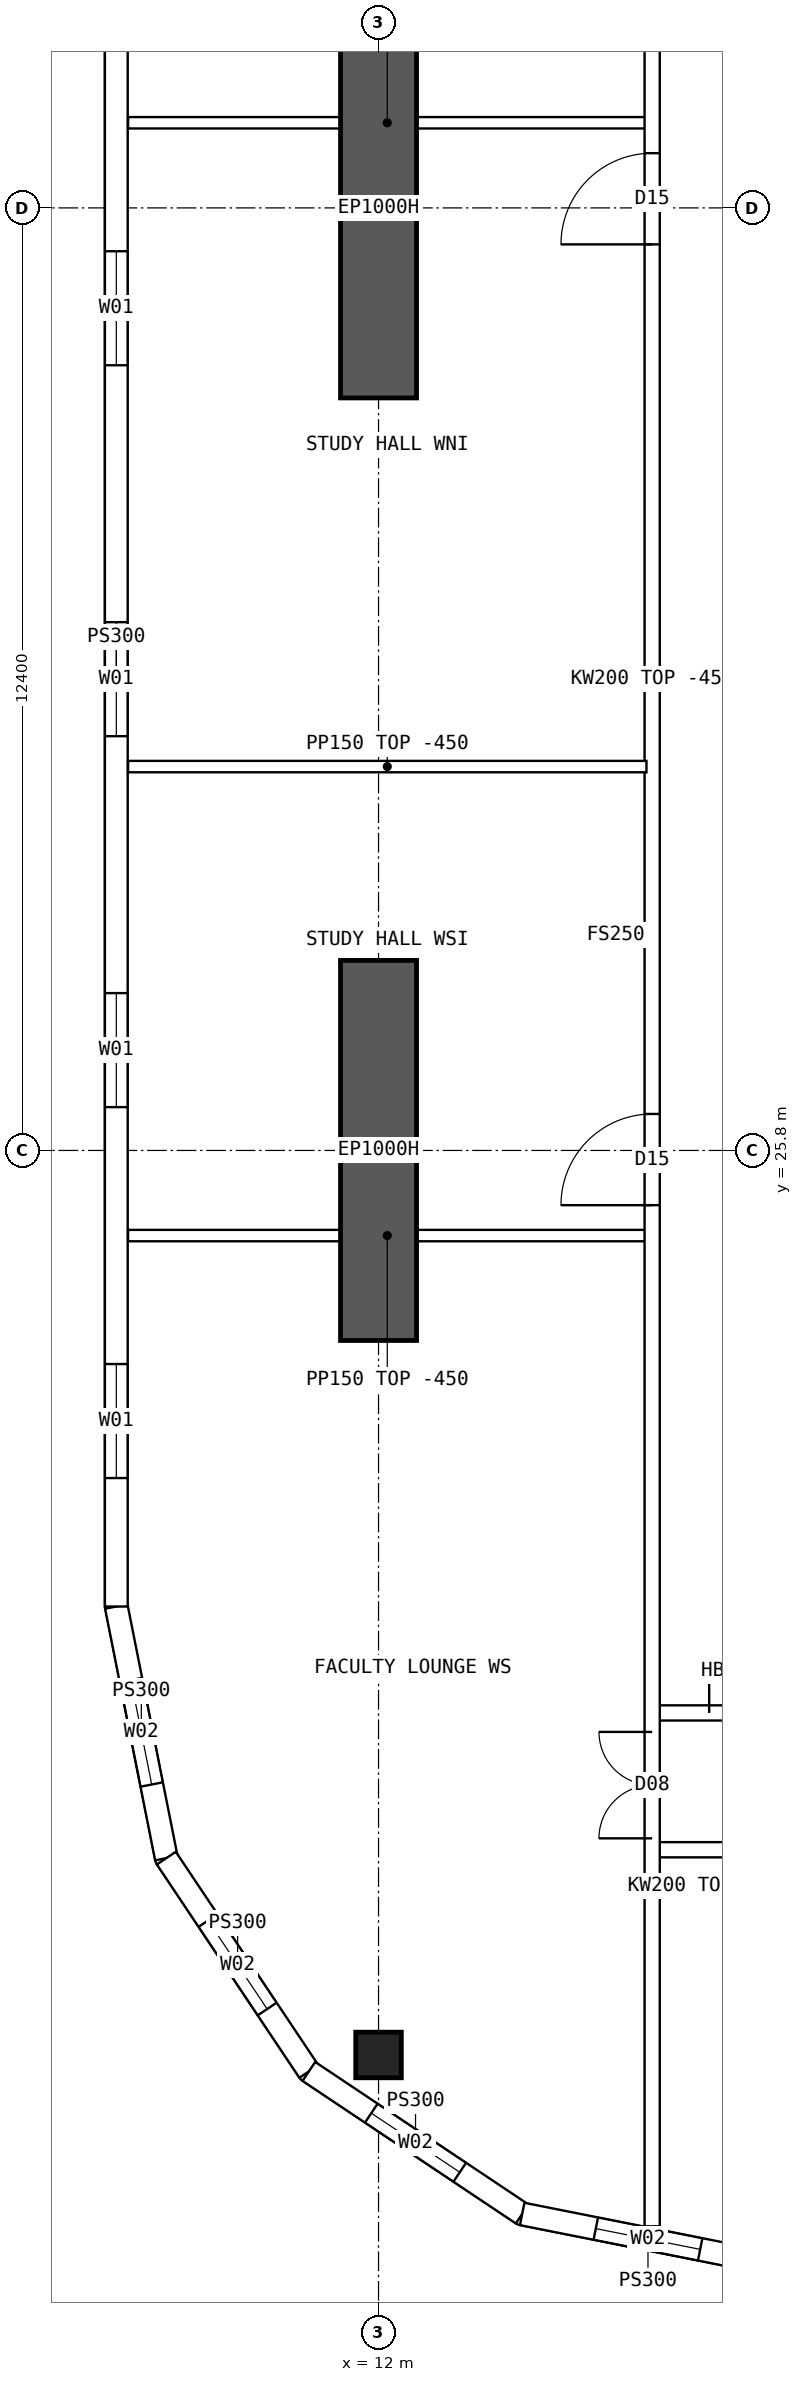
"""IFC4 building model, lengths in metres.
Left out: names, types, materials, properties, quantities, classifications, styles, units other than length and angle.
Written with IfcOpenShell. Run it as: python <this file> out.ifc"""

import sys

from ifc_helpers import new_model, si_unit, direction, frame, frame_2d, origin, origin_2d, place, context, subcontext, project, spatial, polyline, rectangle, hollow_rectangle, outline, extrude, element, fill, save


model = new_model("IFC4")
c1 = context("Model", 3, precision=1e-05, world=origin(), true_north=direction((0.0, 1.0)))
c2 = subcontext(c1, "Body", "Model", "MODEL_VIEW")
j1 = project(units=[si_unit("LENGTHUNIT", "METRE"), si_unit("PLANEANGLEUNIT", "RADIAN")], contexts=[c1])
p1 = place(None, origin())
s1 = spatial("IfcSite", under=j1, at=p1, CompositionType="ELEMENT")
p2 = place(p1, origin())
s2 = spatial("IfcBuilding", under=s1, at=p2, CompositionType="ELEMENT")
p3 = place(p2, frame((0.0, 0.0, 227.8)))
s3 = spatial("IfcBuildingStorey", under=s2, at=p3, CompositionType="ELEMENT", Elevation=227.8)
p4 = place(p3, frame((12.0, 13.9, 0.0), z_axis=(0.0, 0.0, 1.0), x_axis=(1.0, 0.0, 0.0)))
e1 = element("IfcColumn", 1, at=p4, inside=s3, PredefinedType="COLUMN", context=c2, shape_type="SweptSolid", body=[
    extrude(hollow_rectangle(XDim=0.6, YDim=0.6, WallThickness=0.06, at=origin_2d()), origin(), (0.0, 0.0, 1.0), 3.75),
])
for number, where, z_axis, x_axis in (
    (2, (12.0, 23.3, 0.0), (0.0, 0.0, 1.0), (0.0, 1.0, 0.0)),
    (3, (12.0, 35.7, 0.0), (0.0, 0.0, 1.0), (0.0, 1.0, 0.0)),
):
    element("IfcWall", number, at=place(p3, frame(where, z_axis=z_axis, x_axis=x_axis)), inside=s3, PredefinedType="SHEAR", context=c2, shape_type="SweptSolid", body=[
        extrude(rectangle(XDim=5.0, YDim=1.0, at=frame_2d((2.5, 0.0))), origin(), (0.0, 0.0, 1.0), 3.75),
    ])
p5 = place(p3, frame((8.55, 44.2, 0.0), z_axis=(0.0, 0.0, 1.0), x_axis=(0.0, -1.0, 0.0)))
e4 = element("IfcWall", 4, at=p5, inside=s3, PredefinedType="SOLIDWALL", context=c2, shape_type="SweptSolid", body=[
    extrude(outline(polyline([(-0.015, -0.15), (24.415, -0.15), (24.385, 0.15), (0.015, 0.15), (-0.015, -0.15)])), origin(), (0.0, 0.0, 1.0), 3.3),
])
p6 = place(p5, frame((1.69, 0.0, 0.9)))
e5 = element("IfcOpeningElement", 5, at=p6, cuts=e4, PredefinedType="OPENING", context=c2, shape_type="SweptSolid", body=[
    extrude(rectangle(XDim=1.5, YDim=2.0, at=frame_2d((0.75, 1.0))), frame((0.0, 0.16, 0.0), z_axis=(0.0, -1.0, 0.0), x_axis=(1.0, 0.0, 0.0)), (0.0, 0.0, 1.0), 0.32),
])
p7 = place(p5, frame((6.57, 0.0, 0.9)))
e6 = element("IfcOpeningElement", 6, at=p7, cuts=e4, PredefinedType="OPENING", context=c2, shape_type="SweptSolid", body=[
    extrude(rectangle(XDim=1.5, YDim=2.0, at=frame_2d((0.75, 1.0))), frame((0.0, 0.16, 0.0), z_axis=(0.0, -1.0, 0.0), x_axis=(1.0, 0.0, 0.0)), (0.0, 0.0, 1.0), 0.32),
])
p8 = place(p5, frame((11.45, 0.0, 0.9)))
e7 = element("IfcOpeningElement", 7, at=p8, cuts=e4, PredefinedType="OPENING", context=c2, shape_type="SweptSolid", body=[
    extrude(rectangle(XDim=1.5, YDim=2.0, at=frame_2d((0.75, 1.0))), frame((0.0, 0.16, 0.0), z_axis=(0.0, -1.0, 0.0), x_axis=(1.0, 0.0, 0.0)), (0.0, 0.0, 1.0), 0.32),
])
p9 = place(p5, frame((16.33, 0.0, 0.9)))
e8 = element("IfcOpeningElement", 8, at=p9, cuts=e4, PredefinedType="OPENING", context=c2, shape_type="SweptSolid", body=[
    extrude(rectangle(XDim=1.5, YDim=2.0, at=frame_2d((0.75, 1.0))), frame((0.0, 0.16, 0.0), z_axis=(0.0, -1.0, 0.0), x_axis=(1.0, 0.0, 0.0)), (0.0, 0.0, 1.0), 0.32),
])
p10 = place(p5, frame((21.21, 0.0, 0.9)))
e9 = element("IfcOpeningElement", 9, at=p10, cuts=e4, PredefinedType="OPENING", context=c2, shape_type="SweptSolid", body=[
    extrude(rectangle(XDim=1.5, YDim=2.0, at=frame_2d((0.75, 1.0))), frame((0.0, 0.16, 0.0), z_axis=(0.0, -1.0, 0.0), x_axis=(1.0, 0.0, 0.0)), (0.0, 0.0, 1.0), 0.32),
])
p11 = place(p3, frame((8.55, 19.8, 0.0), z_axis=(0.0, 0.0, 1.0), x_axis=(0.19508664885, -0.980786011034, 0.0)))
e10 = element("IfcWall", 10, at=p11, inside=s3, PredefinedType="SOLIDWALL", context=c2, shape_type="SweptSolid", body=[
    extrude(outline(polyline([(-0.015, -0.15), (3.405, -0.15), (3.345, 0.15), (0.015, 0.15), (-0.015, -0.15)])), origin(), (0.0, 0.0, 1.0), 3.3),
])
p12 = place(p11, frame((0.988, 0.0, 0.9)))
e11 = element("IfcOpeningElement", 11, at=p12, cuts=e10, PredefinedType="OPENING", context=c2, shape_type="SweptSolid", body=[
    extrude(rectangle(XDim=1.4, YDim=1.8, at=frame_2d((0.7, 0.9))), frame((0.0, 0.16, 0.0), z_axis=(0.0, -1.0, 0.0), x_axis=(1.0, 0.0, 0.0)), (0.0, 0.0, 1.0), 0.32),
])
p13 = place(p3, frame((9.208, 16.49, 0.0), z_axis=(0.0, 0.0, 1.0), x_axis=(0.555567969291, -0.831471124873, 0.0)))
e12 = element("IfcWall", 12, at=p13, inside=s3, PredefinedType="SOLIDWALL", context=c2, shape_type="SweptSolid", body=[
    extrude(outline(polyline([(-0.03, -0.15), (3.405, -0.15), (3.345, 0.15), (0.03, 0.15), (-0.03, -0.15)])), origin(), (0.0, 0.0, 1.0), 3.3),
])
p14 = place(p13, frame((0.988, 0.0, 0.9)))
e13 = element("IfcOpeningElement", 13, at=p14, cuts=e12, PredefinedType="OPENING", context=c2, shape_type="SweptSolid", body=[
    extrude(rectangle(XDim=1.4, YDim=1.8, at=frame_2d((0.7, 0.9))), frame((0.0, 0.16, 0.0), z_axis=(0.0, -1.0, 0.0), x_axis=(1.0, 0.0, 0.0)), (0.0, 0.0, 1.0), 0.32),
])
p15 = place(p3, frame((11.083, 13.684, 0.0), z_axis=(0.0, 0.0, 1.0), x_axis=(0.831460037396, -0.555584562613, 0.0)))
e14 = element("IfcWall", 14, at=p15, inside=s3, PredefinedType="SOLIDWALL", context=c2, shape_type="SweptSolid", body=[
    extrude(outline(polyline([(-0.03, -0.15), (3.405, -0.15), (3.345, 0.15), (0.03, 0.15), (-0.03, -0.15)])), origin(), (0.0, 0.0, 1.0), 3.3),
])
p16 = place(p15, frame((0.988, 0.0, 0.9)))
e15 = element("IfcOpeningElement", 15, at=p16, cuts=e14, PredefinedType="OPENING", context=c2, shape_type="SweptSolid", body=[
    extrude(rectangle(XDim=1.4, YDim=1.8, at=frame_2d((0.7, 0.9))), frame((0.0, 0.16, 0.0), z_axis=(0.0, -1.0, 0.0), x_axis=(1.0, 0.0, 0.0)), (0.0, 0.0, 1.0), 0.32),
])
p17 = place(p3, frame((13.89, 11.808, 0.0), z_axis=(0.0, 0.0, 1.0), x_axis=(0.98078325777, -0.195100490205, 0.0)))
e16 = element("IfcWall", 16, at=p17, inside=s3, PredefinedType="SOLIDWALL", context=c2, shape_type="SweptSolid", body=[
    extrude(outline(polyline([(-0.03, -0.15), (3.405, -0.15), (3.345, 0.15), (0.03, 0.15), (-0.03, -0.15)])), origin(), (0.0, 0.0, 1.0), 3.3),
])
p18 = place(p17, frame((0.988, 0.0, 0.9)))
e17 = element("IfcOpeningElement", 17, at=p18, cuts=e16, PredefinedType="OPENING", context=c2, shape_type="SweptSolid", body=[
    extrude(rectangle(XDim=1.4, YDim=1.8, at=frame_2d((0.7, 0.9))), frame((0.0, 0.16, 0.0), z_axis=(0.0, -1.0, 0.0), x_axis=(1.0, 0.0, 0.0)), (0.0, 0.0, 1.0), 0.32),
])
p19 = place(p3, frame((15.6, 16.6, 0.0), z_axis=(0.0, 0.0, 1.0), x_axis=(1.0, 0.0, 0.0)))
e18 = element("IfcWall", 18, at=p19, inside=s3, PredefinedType="SOLIDWALL", context=c2, shape_type="SweptSolid", body=[
    extrude(rectangle(XDim=2.05, YDim=0.2, at=frame_2d((1.025, 0.0))), origin(), (0.0, 0.0, 1.0), 3.3),
])
p20 = place(p19, frame((0.95, 0.0, 0.0)))
e19 = element("IfcOpeningElement", 19, at=p20, cuts=e18, PredefinedType="OPENING", context=c2, shape_type="SweptSolid", body=[
    extrude(rectangle(XDim=0.9, YDim=2.1, at=frame_2d((0.45, 1.05))), frame((0.0, 0.11, 0.0), z_axis=(0.0, -1.0, 0.0), x_axis=(1.0, 0.0, 0.0)), (0.0, 0.0, 1.0), 0.22),
])
p21 = place(p3, frame((15.6, 18.4, 0.0), z_axis=(0.0, 0.0, 1.0), x_axis=(1.0, 0.0, 0.0)))
e20 = element("IfcWall", 20, at=p21, inside=s3, PredefinedType="SOLIDWALL", context=c2, shape_type="SweptSolid", body=[
    extrude(rectangle(XDim=2.05, YDim=0.2, at=frame_2d((1.025, 0.0))), origin(), (0.0, 0.0, 1.0), 3.3),
])
p22 = place(p21, frame((0.75, 0.0, 0.0)))
e21 = element("IfcOpeningElement", 21, at=p22, cuts=e20, PredefinedType="OPENING", context=c2, shape_type="SweptSolid", body=[
    extrude(rectangle(XDim=1.2, YDim=2.1, at=frame_2d((0.6, 1.05))), frame((0.0, 0.11, 0.0), z_axis=(0.0, -1.0, 0.0), x_axis=(1.0, 0.0, 0.0)), (0.0, 0.0, 1.0), 0.22),
])
p23 = place(p3, frame((8.705, 30.85, 0.0), z_axis=(0.0, 0.0, 1.0), x_axis=(1.0, 0.0, 0.0)))
e22 = element("IfcWall", 22, at=p23, inside=s3, PredefinedType="PARTITIONING", context=c2, shape_type="SweptSolid", body=[
    extrude(outline(polyline([(0.0, 0.0), (6.82, 0.0), (6.82, 3.3), (3.597, 3.3), (3.595, 2.85), (2.997, 2.85), (2.995, 3.3), (0.0, 3.3), (0.0, 0.0)])), frame((0.0, 0.075, 0.0), z_axis=(0.0, -1.0, 0.0), x_axis=(1.0, 0.0, 0.0)), (0.0, 0.0, 1.0), 0.15),
])
p24 = place(p3, frame((15.6, 11.646, 0.0), z_axis=(0.0, 0.0, 1.0), x_axis=(0.0, 1.0, 0.0)))
e23 = element("IfcWall", 23, at=p24, inside=s3, PredefinedType="SOLIDWALL", context=c2, shape_type="SweptSolid", body=[
    extrude(rectangle(XDim=40.708, YDim=0.2, at=frame_2d((20.354, 0.0))), origin(), (0.0, 0.0, 1.0), 3.3),
])
p25 = place(p24, frame((13.434, 0.0, 0.0)))
e24 = element("IfcOpeningElement", 24, at=p25, cuts=e23, PredefinedType="OPENING", context=c2, shape_type="SweptSolid", body=[
    extrude(rectangle(XDim=1.2, YDim=2.1, at=frame_2d((0.6, 1.05))), frame((0.0, 0.11, 0.0), z_axis=(0.0, -1.0, 0.0), x_axis=(1.0, 0.0, 0.0)), (0.0, 0.0, 1.0), 0.22),
])
p26 = place(p24, frame((26.074, 0.0, 0.0)))
e25 = element("IfcOpeningElement", 25, at=p26, cuts=e23, PredefinedType="OPENING", context=c2, shape_type="SweptSolid", body=[
    extrude(rectangle(XDim=1.2, YDim=2.1, at=frame_2d((0.6, 1.05))), frame((0.0, 0.11, 0.0), z_axis=(0.0, -1.0, 0.0), x_axis=(1.0, 0.0, 0.0)), (0.0, 0.0, 1.0), 0.22),
])
p27 = place(p24, frame((5.104, 0.0, 0.0)))
e26 = element("IfcOpeningElement", 26, at=p27, cuts=e23, PredefinedType="OPENING", context=c2, shape_type="SweptSolid", body=[
    extrude(rectangle(XDim=1.4, YDim=2.1, at=frame_2d((0.7, 1.05))), frame((0.0, 0.11, 0.0), z_axis=(0.0, -1.0, 0.0), x_axis=(1.0, 0.0, 0.0)), (0.0, 0.0, 1.0), 0.22),
])
p28 = place(p24, frame((34.104, 0.0, 0.0)))
e27 = element("IfcOpeningElement", 27, at=p28, cuts=e23, PredefinedType="OPENING", context=c2, shape_type="SweptSolid", body=[
    extrude(rectangle(XDim=1.4, YDim=2.1, at=frame_2d((0.7, 1.05))), frame((0.0, 0.11, 0.0), z_axis=(0.0, -1.0, 0.0), x_axis=(1.0, 0.0, 0.0)), (0.0, 0.0, 1.0), 0.22),
])
for number, where, z_axis, x_axis in (
    (28, (8.705, 24.68, 0.0), (0.0, 0.0, 1.0), (1.0, 0.0, 0.0)),
    (29, (8.705, 39.32, 0.0), (0.0, 0.0, 1.0), (1.0, 0.0, 0.0)),
):
    element("IfcWall", number, at=place(p3, frame(where, z_axis=z_axis, x_axis=x_axis)), inside=s3, PredefinedType="PARTITIONING", context=c2, shape_type="SweptSolid", body=[
        extrude(rectangle(XDim=6.82, YDim=0.15, at=frame_2d((3.41, 0.0))), origin(), (0.0, 0.0, 1.0), 3.3),
    ])
p29 = place(p7, origin())
e30 = element("IfcWindow", 30, at=p29, inside=s3, PartitioningType="SINGLE_PANEL", PredefinedType="WINDOW", context=c2, shape_type="SweptSolid", body=[
    extrude(rectangle(XDim=1.5, YDim=2.0, at=frame_2d((0.75, 1.0))), frame((0.0, 0.03, 0.0), z_axis=(0.0, -1.0, 0.0), x_axis=(1.0, 0.0, 0.0)), (0.0, 0.0, 1.0), 0.06),
])
fill(e6, e30)
p30 = place(p8, origin())
e31 = element("IfcWindow", 31, at=p30, inside=s3, PartitioningType="SINGLE_PANEL", PredefinedType="WINDOW", context=c2, shape_type="SweptSolid", body=[
    extrude(rectangle(XDim=1.5, YDim=2.0, at=frame_2d((0.75, 1.0))), frame((0.0, 0.03, 0.0), z_axis=(0.0, -1.0, 0.0), x_axis=(1.0, 0.0, 0.0)), (0.0, 0.0, 1.0), 0.06),
])
fill(e7, e31)
p31 = place(p9, origin())
e32 = element("IfcWindow", 32, at=p31, inside=s3, PartitioningType="SINGLE_PANEL", PredefinedType="WINDOW", context=c2, shape_type="SweptSolid", body=[
    extrude(rectangle(XDim=1.5, YDim=2.0, at=frame_2d((0.75, 1.0))), frame((0.0, 0.03, 0.0), z_axis=(0.0, -1.0, 0.0), x_axis=(1.0, 0.0, 0.0)), (0.0, 0.0, 1.0), 0.06),
])
fill(e8, e32)
p32 = place(p10, origin())
e33 = element("IfcWindow", 33, at=p32, inside=s3, PartitioningType="SINGLE_PANEL", PredefinedType="WINDOW", context=c2, shape_type="SweptSolid", body=[
    extrude(rectangle(XDim=1.5, YDim=2.0, at=frame_2d((0.75, 1.0))), frame((0.0, 0.03, 0.0), z_axis=(0.0, -1.0, 0.0), x_axis=(1.0, 0.0, 0.0)), (0.0, 0.0, 1.0), 0.06),
])
fill(e9, e33)
p33 = place(p12, origin())
e34 = element("IfcWindow", 34, at=p33, inside=s3, PartitioningType="SINGLE_PANEL", PredefinedType="WINDOW", context=c2, shape_type="SweptSolid", body=[
    extrude(rectangle(XDim=1.4, YDim=1.8, at=frame_2d((0.7, 0.9))), frame((0.0, 0.03, 0.0), z_axis=(0.0, -1.0, 0.0), x_axis=(1.0, 0.0, 0.0)), (0.0, 0.0, 1.0), 0.06),
])
fill(e11, e34)
p34 = place(p14, origin())
e35 = element("IfcWindow", 35, at=p34, inside=s3, PartitioningType="SINGLE_PANEL", PredefinedType="WINDOW", context=c2, shape_type="SweptSolid", body=[
    extrude(rectangle(XDim=1.4, YDim=1.8, at=frame_2d((0.7, 0.9))), frame((0.0, 0.03, 0.0), z_axis=(0.0, -1.0, 0.0), x_axis=(1.0, 0.0, 0.0)), (0.0, 0.0, 1.0), 0.06),
])
fill(e13, e35)
p35 = place(p16, origin())
e36 = element("IfcWindow", 36, at=p35, inside=s3, PartitioningType="SINGLE_PANEL", PredefinedType="WINDOW", context=c2, shape_type="SweptSolid", body=[
    extrude(rectangle(XDim=1.4, YDim=1.8, at=frame_2d((0.7, 0.9))), frame((0.0, 0.03, 0.0), z_axis=(0.0, -1.0, 0.0), x_axis=(1.0, 0.0, 0.0)), (0.0, 0.0, 1.0), 0.06),
])
fill(e15, e36)
p36 = place(p18, origin())
e37 = element("IfcWindow", 37, at=p36, inside=s3, PartitioningType="SINGLE_PANEL", PredefinedType="WINDOW", context=c2, shape_type="SweptSolid", body=[
    extrude(rectangle(XDim=1.4, YDim=1.8, at=frame_2d((0.7, 0.9))), frame((0.0, 0.03, 0.0), z_axis=(0.0, -1.0, 0.0), x_axis=(1.0, 0.0, 0.0)), (0.0, 0.0, 1.0), 0.06),
])
fill(e17, e37)
p37 = place(p22, origin())
e38 = element("IfcDoor", 38, at=p37, inside=s3, OperationType="DOUBLE_DOOR_SINGLE_SWING", PredefinedType="DOOR", context=c2, shape_type="SweptSolid", body=[
    extrude(rectangle(XDim=1.2, YDim=2.1, at=frame_2d((0.6, 1.05))), frame((0.0, 0.025, 0.0), z_axis=(0.0, -1.0, 0.0), x_axis=(1.0, 0.0, 0.0)), (0.0, 0.0, 1.0), 0.05),
])
fill(e21, e38)
p38 = place(p25, origin())
e39 = element("IfcDoor", 39, at=p38, inside=s3, OperationType="SINGLE_SWING_LEFT", PredefinedType="DOOR", context=c2, shape_type="SweptSolid", body=[
    extrude(rectangle(XDim=1.2, YDim=2.1, at=frame_2d((0.6, 1.05))), frame((0.0, 0.025, 0.0), z_axis=(0.0, -1.0, 0.0), x_axis=(1.0, 0.0, 0.0)), (0.0, 0.0, 1.0), 0.05),
])
fill(e24, e39)
p39 = place(p26, origin())
e40 = element("IfcDoor", 40, at=p39, inside=s3, OperationType="SINGLE_SWING_LEFT", PredefinedType="DOOR", context=c2, shape_type="SweptSolid", body=[
    extrude(rectangle(XDim=1.2, YDim=2.1, at=frame_2d((0.6, 1.05))), frame((0.0, 0.025, 0.0), z_axis=(0.0, -1.0, 0.0), x_axis=(1.0, 0.0, 0.0)), (0.0, 0.0, 1.0), 0.05),
])
fill(e25, e40)
p40 = place(p27, origin())
e41 = element("IfcDoor", 41, at=p40, inside=s3, OperationType="DOUBLE_DOOR_SINGLE_SWING", PredefinedType="DOOR", context=c2, shape_type="SweptSolid", body=[
    extrude(rectangle(XDim=1.4, YDim=2.1, at=frame_2d((0.7, 1.05))), frame((0.0, 0.025, 0.0), z_axis=(0.0, -1.0, 0.0), x_axis=(1.0, 0.0, 0.0)), (0.0, 0.0, 1.0), 0.05),
])
fill(e26, e41)
save(model, sys.argv[1])
